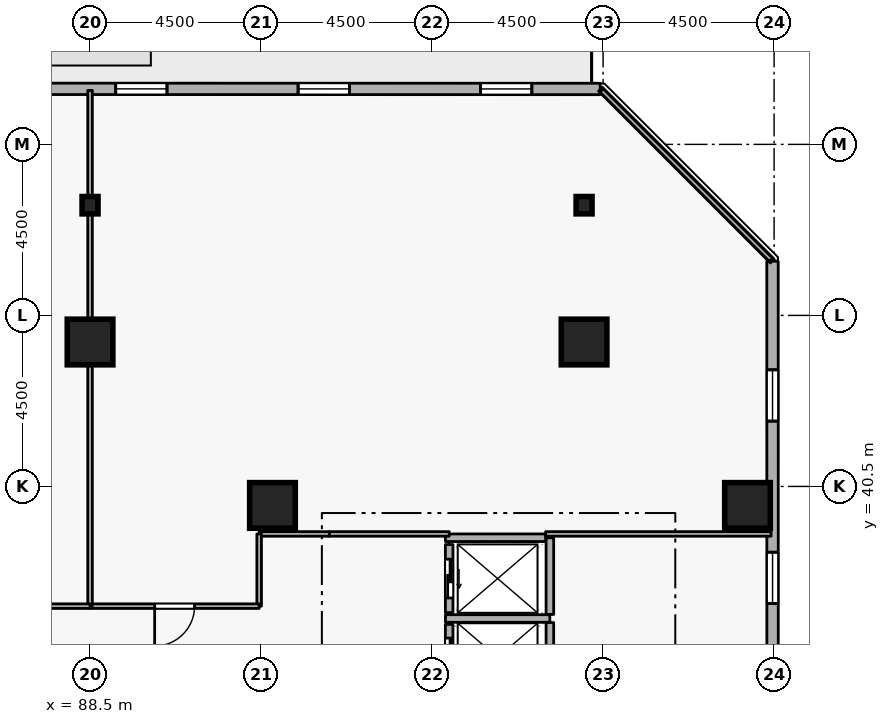
"""IFC4 building model, lengths in metres.
Left out: names, types, materials, properties, quantities, classifications, styles, units other than length and angle.
Written with IfcOpenShell. Run it as: python <this file> out.ifc"""

import sys

from ifc_helpers import new_model, si_unit, direction, frame, frame_2d, origin, origin_2d, place, context, subcontext, project, spatial, rectangle, i_section, extrude, element, fill, save


model = new_model("IFC4")
c1 = context("Model", 3, precision=1e-05, world=origin(), true_north=direction((0.0, 1.0)))
c2 = subcontext(c1, "Body", "Model", "MODEL_VIEW")
j1 = project(units=[si_unit("LENGTHUNIT", "METRE"), si_unit("PLANEANGLEUNIT", "RADIAN")], contexts=[c1])
p1 = place(None, origin())
s1 = spatial("IfcSite", under=j1, at=p1, CompositionType="ELEMENT")
p2 = place(p1, origin())
s2 = spatial("IfcBuilding", under=s1, at=p2, CompositionType="ELEMENT")
p3 = place(p2, frame((0.0, 0.0, 94.5)))
s3 = spatial("IfcBuildingStorey", under=s2, at=p3, CompositionType="ELEMENT", Elevation=94.5)
for number, where, z_axis, x_axis in (
    (1, (105.8, 40.0, 0.0), (0.0, 0.0, 1.0), (1.0, 0.0, 0.0)),
    (2, (101.5, 44.3, 0.0), (0.0, 0.0, 1.0), (1.0, 0.0, 0.0)),
    (3, (88.5, 44.3, 0.0), (0.0, 0.0, 1.0), (1.0, 0.0, 0.0)),
    (4, (93.3, 40.0, 0.0), (0.0, 0.0, 1.0), (1.0, 0.0, 0.0)),
):
    element("IfcColumn", number, at=place(p3, frame(where, z_axis=z_axis, x_axis=x_axis)), inside=s3, PredefinedType="COLUMN", context=c2, shape_type="SweptSolid", body=[
        extrude(rectangle(XDim=1.2, YDim=1.2, at=origin_2d()), origin(), (0.0, 0.0, 1.0), 3.6),
    ])
for number, where, z_axis, x_axis in (
    (5, (101.5, 47.9, 0.0), (0.0, 0.0, 1.0), (1.0, 0.0, 0.0)),
    (6, (88.5, 47.9, 0.0), (0.0, 0.0, 1.0), (1.0, 0.0, 0.0)),
):
    element("IfcColumn", number, at=place(p3, frame(where, z_axis=z_axis, x_axis=x_axis)), inside=s3, PredefinedType="COLUMN", context=c2, shape_type="SweptSolid", body=[
        extrude(i_section(OverallWidth=0.418, OverallDepth=0.456, WebThickness=0.042, FlangeThickness=0.067, FilletRadius=0.015, at=origin_2d()), origin(), (0.0, 0.0, 1.0), 3.6),
    ])
p4 = place(p3, frame((106.465, 11.619, 0.0), z_axis=(0.0, 0.0, 1.0), x_axis=(-0.000182370391, 0.999999983371, 0.0)))
e7 = element("IfcWall", 7, at=p4, inside=s3, PredefinedType="STANDARD", context=c2, shape_type="SweptSolid", body=[
    extrude(rectangle(XDim=34.806, YDim=0.3, at=frame_2d((17.403, 0.0))), origin(), (0.0, 0.0, 1.0), 2.22),
])
p5 = place(p4, frame((6.6, 0.0, 0.72)))
e8 = element("IfcOpeningElement", 8, at=p5, cuts=e7, PredefinedType="OPENING", context=c2, shape_type="SweptSolid", body=[
    extrude(rectangle(XDim=1.35, YDim=1.05, at=frame_2d((0.675, 0.525))), frame((0.0, 0.16, 0.0), z_axis=(0.0, -1.0, 0.0), x_axis=(1.0, 0.0, 0.0)), (0.0, 0.0, 1.0), 0.32),
])
p6 = place(p4, frame((11.4, 0.0, 0.72)))
e9 = element("IfcOpeningElement", 9, at=p6, cuts=e7, PredefinedType="OPENING", context=c2, shape_type="SweptSolid", body=[
    extrude(rectangle(XDim=1.35, YDim=1.05, at=frame_2d((0.675, 0.525))), frame((0.0, 0.16, 0.0), z_axis=(0.0, -1.0, 0.0), x_axis=(1.0, 0.0, 0.0)), (0.0, 0.0, 1.0), 0.32),
])
p7 = place(p4, frame((21.0, 0.0, 0.72)))
e10 = element("IfcOpeningElement", 10, at=p7, cuts=e7, PredefinedType="OPENING", context=c2, shape_type="SweptSolid", body=[
    extrude(rectangle(XDim=1.35, YDim=1.05, at=frame_2d((0.675, 0.525))), frame((0.0, 0.16, 0.0), z_axis=(0.0, -1.0, 0.0), x_axis=(1.0, 0.0, 0.0)), (0.0, 0.0, 1.0), 0.32),
])
p8 = place(p4, frame((25.8, 0.0, 0.72)))
e11 = element("IfcOpeningElement", 11, at=p8, cuts=e7, PredefinedType="OPENING", context=c2, shape_type="SweptSolid", body=[
    extrude(rectangle(XDim=1.35, YDim=1.05, at=frame_2d((0.675, 0.525))), frame((0.0, 0.16, 0.0), z_axis=(0.0, -1.0, 0.0), x_axis=(1.0, 0.0, 0.0)), (0.0, 0.0, 1.0), 0.32),
])
p9 = place(p4, frame((30.6, 0.0, 0.72)))
e12 = element("IfcOpeningElement", 12, at=p9, cuts=e7, PredefinedType="OPENING", context=c2, shape_type="SweptSolid", body=[
    extrude(rectangle(XDim=1.35, YDim=1.05, at=frame_2d((0.675, 0.525))), frame((0.0, 0.16, 0.0), z_axis=(0.0, -1.0, 0.0), x_axis=(1.0, 0.0, 0.0)), (0.0, 0.0, 1.0), 0.32),
])
p10 = place(p3, frame((101.925, 50.958, 0.0), z_axis=(0.0, 0.0, 1.0), x_axis=(-0.999999983371, 0.000182370391, 0.0)))
e13 = element("IfcWall", 13, at=p10, inside=s3, PredefinedType="STANDARD", context=c2, shape_type="SweptSolid", body=[
    extrude(rectangle(XDim=34.806, YDim=0.3, at=frame_2d((17.403, 0.0))), origin(), (0.0, 0.0, 1.0), 2.22),
])
p11 = place(p10, frame((19.203, 0.0, 0.0)))
e14 = element("IfcOpeningElement", 14, at=p11, cuts=e13, PredefinedType="OPENING", context=c2, shape_type="SweptSolid", body=[
    extrude(rectangle(XDim=1.0, YDim=2.08, at=frame_2d((0.5, 1.04))), frame((0.0, 0.16, 0.0), z_axis=(0.0, -1.0, 0.0), x_axis=(1.0, 0.0, 0.0)), (0.0, 0.0, 1.0), 0.32),
])
p12 = place(p10, frame((1.8, 0.0, 0.72)))
e15 = element("IfcOpeningElement", 15, at=p12, cuts=e13, PredefinedType="OPENING", context=c2, shape_type="SweptSolid", body=[
    extrude(rectangle(XDim=1.35, YDim=1.05, at=frame_2d((0.675, 0.525))), frame((0.0, 0.16, 0.0), z_axis=(0.0, -1.0, 0.0), x_axis=(1.0, 0.0, 0.0)), (0.0, 0.0, 1.0), 0.32),
])
p13 = place(p10, frame((6.6, 0.0, 0.72)))
e16 = element("IfcOpeningElement", 16, at=p13, cuts=e13, PredefinedType="OPENING", context=c2, shape_type="SweptSolid", body=[
    extrude(rectangle(XDim=1.35, YDim=1.05, at=frame_2d((0.675, 0.525))), frame((0.0, 0.16, 0.0), z_axis=(0.0, -1.0, 0.0), x_axis=(1.0, 0.0, 0.0)), (0.0, 0.0, 1.0), 0.32),
])
p14 = place(p10, frame((11.4, 0.0, 0.72)))
e17 = element("IfcOpeningElement", 17, at=p14, cuts=e13, PredefinedType="OPENING", context=c2, shape_type="SweptSolid", body=[
    extrude(rectangle(XDim=1.35, YDim=1.05, at=frame_2d((0.675, 0.525))), frame((0.0, 0.16, 0.0), z_axis=(0.0, -1.0, 0.0), x_axis=(1.0, 0.0, 0.0)), (0.0, 0.0, 1.0), 0.32),
])
p15 = place(p10, frame((21.0, 0.0, 0.72)))
e18 = element("IfcOpeningElement", 18, at=p15, cuts=e13, PredefinedType="OPENING", context=c2, shape_type="SweptSolid", body=[
    extrude(rectangle(XDim=1.35, YDim=1.05, at=frame_2d((0.675, 0.525))), frame((0.0, 0.16, 0.0), z_axis=(0.0, -1.0, 0.0), x_axis=(1.0, 0.0, 0.0)), (0.0, 0.0, 1.0), 0.32),
])
p16 = place(p10, frame((25.8, 0.0, 0.72)))
e19 = element("IfcOpeningElement", 19, at=p16, cuts=e13, PredefinedType="OPENING", context=c2, shape_type="SweptSolid", body=[
    extrude(rectangle(XDim=1.35, YDim=1.05, at=frame_2d((0.675, 0.525))), frame((0.0, 0.16, 0.0), z_axis=(0.0, -1.0, 0.0), x_axis=(1.0, 0.0, 0.0)), (0.0, 0.0, 1.0), 0.32),
])
p17 = place(p10, frame((30.6, 0.0, 0.72)))
e20 = element("IfcOpeningElement", 20, at=p17, cuts=e13, PredefinedType="OPENING", context=c2, shape_type="SweptSolid", body=[
    extrude(rectangle(XDim=1.35, YDim=1.05, at=frame_2d((0.675, 0.525))), frame((0.0, 0.16, 0.0), z_axis=(0.0, -1.0, 0.0), x_axis=(1.0, 0.0, 0.0)), (0.0, 0.0, 1.0), 0.32),
])
p18 = place(p3, frame((97.95, 36.87, 0.0), z_axis=(0.0, 0.0, 1.0), x_axis=(0.0, -1.0, 0.0)))
e21 = element("IfcWall", 21, at=p18, inside=s3, PredefinedType="STANDARD", context=c2, shape_type="SweptSolid", body=[
    extrude(rectangle(XDim=1.74, YDim=0.2, at=frame_2d((0.87, 0.0))), origin(), (0.0, 0.0, 1.0), 3.3),
])
p19 = place(p18, frame((0.36, 0.0, 0.0)))
e22 = element("IfcOpeningElement", 22, at=p19, cuts=e21, PredefinedType="OPENING", context=c2, shape_type="SweptSolid", body=[
    extrude(rectangle(XDim=1.02, YDim=2.06, at=frame_2d((0.51, 1.03))), frame((0.0, 0.11, 0.0), z_axis=(0.0, -1.0, 0.0), x_axis=(1.0, 0.0, 0.0)), (0.0, 0.0, 1.0), 0.22),
])
p20 = place(p3, frame((97.95, 38.97, 0.0), z_axis=(0.0, 0.0, 1.0), x_axis=(0.0, -1.0, 0.0)))
e23 = element("IfcWall", 23, at=p20, inside=s3, PredefinedType="STANDARD", context=c2, shape_type="SweptSolid", body=[
    extrude(rectangle(XDim=1.79, YDim=0.2, at=frame_2d((0.895, 0.0))), origin(), (0.0, 0.0, 1.0), 3.3),
])
p21 = place(p20, frame((0.385, 0.0, 0.0)))
e24 = element("IfcOpeningElement", 24, at=p21, cuts=e23, PredefinedType="OPENING", context=c2, shape_type="SweptSolid", body=[
    extrude(rectangle(XDim=1.02, YDim=2.06, at=frame_2d((0.51, 1.03))), frame((0.0, 0.11, 0.0), z_axis=(0.0, -1.0, 0.0), x_axis=(1.0, 0.0, 0.0)), (0.0, 0.0, 1.0), 0.22),
])
p22 = place(p3, frame((97.852, 37.025, 0.0), z_axis=(0.0, 0.0, 1.0), x_axis=(1.0, 0.0, 0.0)))
e25 = element("IfcWall", 25, at=p22, inside=s3, PredefinedType="STANDARD", context=c2, shape_type="SweptSolid", body=[
    extrude(rectangle(XDim=2.746, YDim=0.2, at=frame_2d((1.373, 0.0))), origin(), (0.0, 0.0, 1.0), 3.3),
])
p23 = place(p3, frame((100.6, 35.062, 0.0), z_axis=(0.0, 0.0, 1.0), x_axis=(0.0, 1.0, 0.0)))
e26 = element("IfcWall", 26, at=p23, inside=s3, PredefinedType="STANDARD", context=c2, shape_type="SweptSolid", body=[
    extrude(rectangle(XDim=1.856, YDim=0.2, at=frame_2d((0.928, 0.0))), origin(), (0.0, 0.0, 1.0), 3.3),
])
p24 = place(p3, frame((100.6, 37.132, 0.0), z_axis=(0.0, 0.0, 1.0), x_axis=(0.0, 1.0, 0.0)))
e27 = element("IfcWall", 27, at=p24, inside=s3, PredefinedType="STANDARD", context=c2, shape_type="SweptSolid", body=[
    extrude(rectangle(XDim=2.016, YDim=0.2, at=frame_2d((1.008, 0.0))), origin(), (0.0, 0.0, 1.0), 3.3),
])
p25 = place(p3, frame((97.852, 39.15, 0.0), z_axis=(0.0, 0.0, 1.0), x_axis=(1.0, 0.0, 0.0)))
e28 = element("IfcWall", 28, at=p25, inside=s3, PredefinedType="STANDARD", context=c2, shape_type="SweptSolid", body=[
    extrude(rectangle(XDim=2.636, YDim=0.2, at=frame_2d((1.318, 0.0))), origin(), (0.0, 0.0, 1.0), 3.3),
])
p26 = place(p3, frame((106.42, 39.25, 0.0), z_axis=(0.0, 0.0, 1.0), x_axis=(-1.0, 0.0, 0.0)))
e29 = element("IfcWall", 29, at=p26, inside=s3, PredefinedType="PARTITIONING", context=c2, shape_type="SweptSolid", body=[
    extrude(rectangle(XDim=5.932, YDim=0.12, at=frame_2d((2.966, 0.0))), origin(), (0.0, 0.0, 1.0), 3.3),
])
p27 = place(p3, frame((97.95, 39.25, 0.0), z_axis=(0.0, 0.0, 1.0), x_axis=(-1.0, 0.0, 0.0)))
e30 = element("IfcWall", 30, at=p27, inside=s3, PredefinedType="PARTITIONING", context=c2, shape_type="SweptSolid", body=[
    extrude(rectangle(XDim=3.15, YDim=0.12, at=frame_2d((1.575, 0.0))), origin(), (0.0, 0.0, 1.0), 3.3),
])
p28 = place(p3, frame((94.8, 39.25, 0.0), z_axis=(0.0, 0.0, 1.0), x_axis=(-1.0, 0.0, 0.0)))
e31 = element("IfcWall", 31, at=p28, inside=s3, PredefinedType="PARTITIONING", context=c2, shape_type="SweptSolid", body=[
    extrude(rectangle(XDim=1.85, YDim=0.12, at=frame_2d((0.925, 0.0))), origin(), (0.0, 0.0, 1.0), 3.3),
])
p29 = place(p3, frame((92.95, 39.25, 0.0), z_axis=(0.0, 0.0, 1.0), x_axis=(0.0, -1.0, 0.0)))
e32 = element("IfcWall", 32, at=p29, inside=s3, PredefinedType="PARTITIONING", context=c2, shape_type="SweptSolid", body=[
    extrude(rectangle(XDim=1.9, YDim=0.12, at=frame_2d((0.95, 0.0))), origin(), (0.0, 0.0, 1.0), 3.3),
])
p30 = place(p3, frame((92.95, 37.35, 0.0), z_axis=(0.0, 0.0, 1.0), x_axis=(-1.0, 0.0, 0.0)))
e33 = element("IfcWall", 33, at=p30, inside=s3, PredefinedType="PARTITIONING", context=c2, shape_type="SweptSolid", body=[
    extrude(rectangle(XDim=4.45, YDim=0.12, at=frame_2d((2.225, 0.0))), origin(), (0.0, 0.0, 1.0), 3.3),
])
p31 = place(p30, frame((1.7, 0.0, 0.0)))
e34 = element("IfcOpeningElement", 34, at=p31, cuts=e33, PredefinedType="OPENING", context=c2, shape_type="SweptSolid", body=[
    extrude(rectangle(XDim=1.05, YDim=2.1, at=frame_2d((0.525, 1.05))), frame((0.0, 0.07, 0.0), z_axis=(0.0, -1.0, 0.0), x_axis=(1.0, 0.0, 0.0)), (0.0, 0.0, 1.0), 0.14),
])
p32 = place(p3, frame((88.5, 37.35, 0.0), z_axis=(0.0, 0.0, 1.0), x_axis=(0.0, 1.0, 0.0)))
e35 = element("IfcWall", 35, at=p32, inside=s3, PredefinedType="PARTITIONING", context=c2, shape_type="SweptSolid", body=[
    extrude(rectangle(XDim=13.57, YDim=0.12, at=frame_2d((6.785, 0.0))), origin(), (0.0, 0.0, 1.0), 2.892),
])
p33 = place(p3, frame((101.961, 50.92, 0.0), z_axis=(0.0, 0.0, 1.0), x_axis=(0.707106781187, -0.707106781187, 0.0)))
e36 = element("IfcWall", 36, at=p33, inside=s3, PredefinedType="PARTITIONING", context=c2, shape_type="SweptSolid", body=[
    extrude(rectangle(XDim=6.305, YDim=0.12, at=frame_2d((3.153, 0.0))), origin(), (0.0, 0.0, 1.0), 3.3),
])
p34 = place(p3, frame((88.5, 37.35, 0.0), z_axis=(0.0, 0.0, 1.0), x_axis=(-1.0, 0.0, 0.0)))
e37 = element("IfcWall", 37, at=p34, inside=s3, PredefinedType="PARTITIONING", context=c2, shape_type="SweptSolid", body=[
    extrude(rectangle(XDim=3.15, YDim=0.12, at=frame_2d((1.575, 0.0))), origin(), (0.0, 0.0, 1.0), 3.3),
])
p35 = place(p34, frame((1.1, 0.0, 0.0)))
e38 = element("IfcOpeningElement", 38, at=p35, cuts=e37, PredefinedType="OPENING", context=c2, shape_type="SweptSolid", body=[
    extrude(rectangle(XDim=0.95, YDim=2.1, at=frame_2d((0.475, 1.05))), frame((0.0, 0.07, 0.0), z_axis=(0.0, -1.0, 0.0), x_axis=(1.0, 0.0, 0.0)), (0.0, 0.0, 1.0), 0.14),
])
p36 = place(p8, origin())
e39 = element("IfcWindow", 39, at=p36, inside=s3, PartitioningType="SINGLE_PANEL", PredefinedType="WINDOW", context=c2, shape_type="SweptSolid", body=[
    extrude(rectangle(XDim=1.35, YDim=1.05, at=frame_2d((0.675, 0.525))), frame((0.0, 0.03, 0.0), z_axis=(0.0, -1.0, 0.0), x_axis=(1.0, 0.0, 0.0)), (0.0, 0.0, 1.0), 0.06),
])
fill(e11, e39)
p37 = place(p9, origin())
e40 = element("IfcWindow", 40, at=p37, inside=s3, PartitioningType="SINGLE_PANEL", PredefinedType="WINDOW", context=c2, shape_type="SweptSolid", body=[
    extrude(rectangle(XDim=1.35, YDim=1.05, at=frame_2d((0.675, 0.525))), frame((0.0, 0.03, 0.0), z_axis=(0.0, -1.0, 0.0), x_axis=(1.0, 0.0, 0.0)), (0.0, 0.0, 1.0), 0.06),
])
fill(e12, e40)
p38 = place(p12, origin())
e41 = element("IfcWindow", 41, at=p38, inside=s3, PartitioningType="SINGLE_PANEL", PredefinedType="WINDOW", context=c2, shape_type="SweptSolid", body=[
    extrude(rectangle(XDim=1.35, YDim=1.05, at=frame_2d((0.675, 0.525))), frame((0.0, 0.03, 0.0), z_axis=(0.0, -1.0, 0.0), x_axis=(1.0, 0.0, 0.0)), (0.0, 0.0, 1.0), 0.06),
])
fill(e15, e41)
p39 = place(p13, origin())
e42 = element("IfcWindow", 42, at=p39, inside=s3, PartitioningType="SINGLE_PANEL", PredefinedType="WINDOW", context=c2, shape_type="SweptSolid", body=[
    extrude(rectangle(XDim=1.35, YDim=1.05, at=frame_2d((0.675, 0.525))), frame((0.0, 0.03, 0.0), z_axis=(0.0, -1.0, 0.0), x_axis=(1.0, 0.0, 0.0)), (0.0, 0.0, 1.0), 0.06),
])
fill(e16, e42)
p40 = place(p14, origin())
e43 = element("IfcWindow", 43, at=p40, inside=s3, PartitioningType="SINGLE_PANEL", PredefinedType="WINDOW", context=c2, shape_type="SweptSolid", body=[
    extrude(rectangle(XDim=1.35, YDim=1.05, at=frame_2d((0.675, 0.525))), frame((0.0, 0.03, 0.0), z_axis=(0.0, -1.0, 0.0), x_axis=(1.0, 0.0, 0.0)), (0.0, 0.0, 1.0), 0.06),
])
fill(e17, e43)
p41 = place(p19, origin())
e44 = element("IfcDoor", 44, at=p41, inside=s3, OperationType="SLIDING_TO_LEFT", PredefinedType="DOOR", context=c2, shape_type="SweptSolid", body=[
    extrude(rectangle(XDim=1.02, YDim=2.06, at=frame_2d((0.51, 1.03))), frame((0.0, 0.025, 0.0), z_axis=(0.0, -1.0, 0.0), x_axis=(1.0, 0.0, 0.0)), (0.0, 0.0, 1.0), 0.05),
])
fill(e22, e44)
p42 = place(p21, origin())
e45 = element("IfcDoor", 45, at=p42, inside=s3, OperationType="SLIDING_TO_LEFT", PredefinedType="DOOR", context=c2, shape_type="SweptSolid", body=[
    extrude(rectangle(XDim=1.02, YDim=2.06, at=frame_2d((0.51, 1.03))), frame((0.0, 0.025, 0.0), z_axis=(0.0, -1.0, 0.0), x_axis=(1.0, 0.0, 0.0)), (0.0, 0.0, 1.0), 0.05),
])
fill(e24, e45)
p43 = place(p31, origin())
e46 = element("IfcDoor", 46, at=p43, inside=s3, OperationType="SINGLE_SWING_RIGHT", PredefinedType="DOOR", context=c2, shape_type="SweptSolid", body=[
    extrude(rectangle(XDim=1.05, YDim=2.1, at=frame_2d((0.525, 1.05))), frame((0.0, 0.025, 0.0), z_axis=(0.0, -1.0, 0.0), x_axis=(1.0, 0.0, 0.0)), (0.0, 0.0, 1.0), 0.05),
])
fill(e34, e46)
save(model, sys.argv[1])
